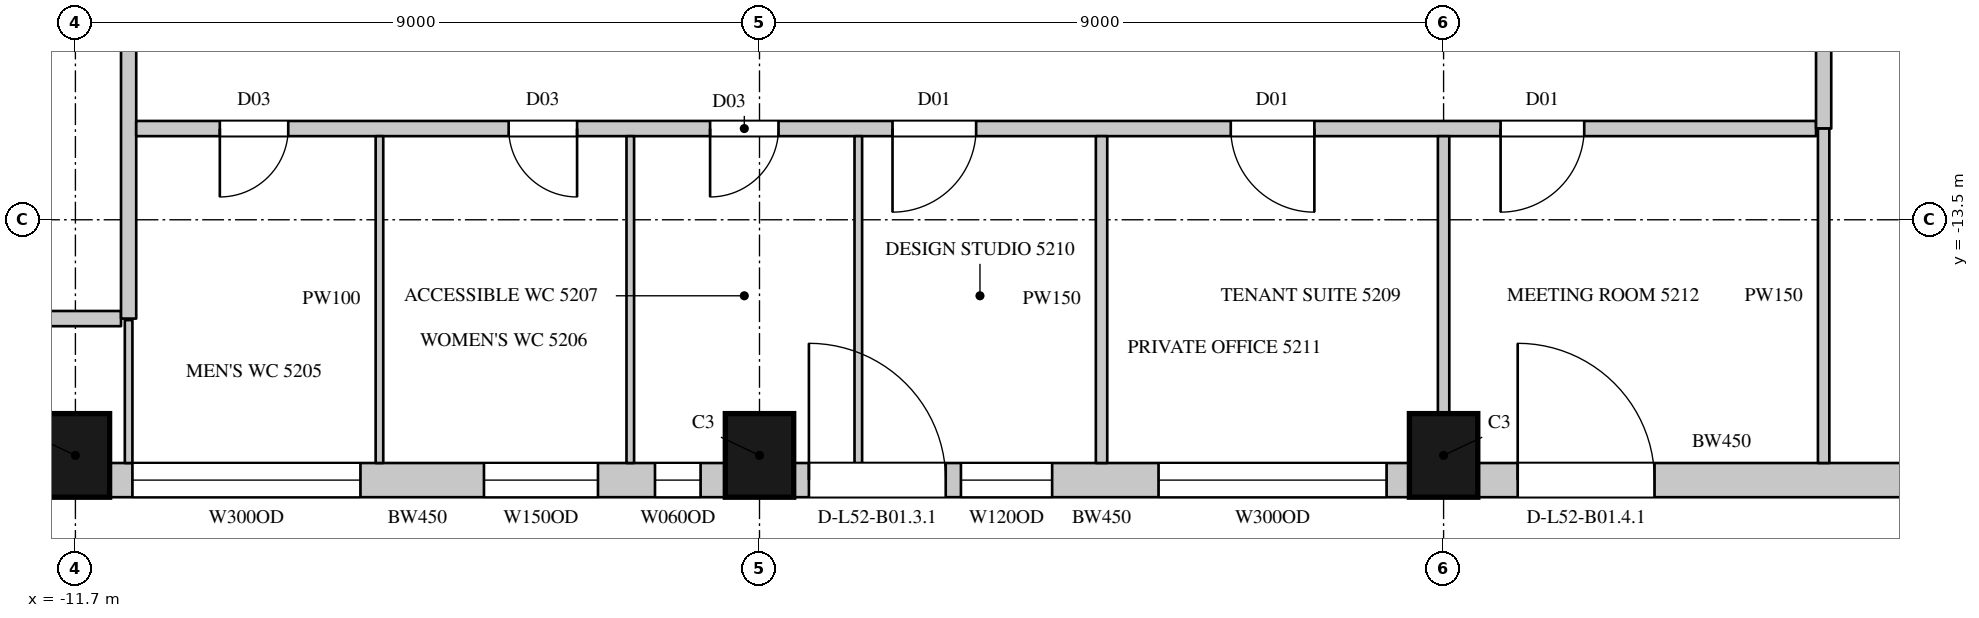
"""IFC4 building model, lengths in metres.
Left out: names, types, materials, properties, quantities, classifications, styles, units other than length and angle.
Written with IfcOpenShell. Run it as: python <this file> out.ifc"""

import sys

from ifc_helpers import new_model, si_unit, direction, frame, frame_2d, origin, origin_2d, place, context, subcontext, project, spatial, rectangle, extrude, element, fill, save


model = new_model("IFC4")
c1 = context("Model", 3, precision=1e-05, world=origin(), true_north=direction((0.0, 1.0)))
c2 = subcontext(c1, "Body", "Model", "MODEL_VIEW")
j1 = project(units=[si_unit("LENGTHUNIT", "METRE"), si_unit("PLANEANGLEUNIT", "RADIAN")], contexts=[c1])
p1 = place(None, origin())
s1 = spatial("IfcSite", under=j1, at=p1, CompositionType="ELEMENT")
p2 = place(p1, origin())
s2 = spatial("IfcBuilding", under=s1, at=p2, CompositionType="ELEMENT")
p3 = place(p2, frame((0.0, 0.0, 234.3)))
s3 = spatial("IfcBuildingStorey", under=s2, at=p3, CompositionType="ELEMENT", Elevation=234.3)
for number, where, z_axis, x_axis in (
    (1, (-11.7, -16.6, 0.0), (0.0, 0.0, 1.0), (1.0, 0.0, 0.0)),
    (2, (-2.7, -16.6, 0.0), (0.0, 0.0, 1.0), (1.0, 0.0, 0.0)),
    (3, (6.3, -16.6, 0.0), (0.0, 0.0, 1.0), (1.0, 0.0, 0.0)),
):
    element("IfcColumn", number, at=place(p3, frame(where, z_axis=z_axis, x_axis=x_axis)), inside=s3, PredefinedType="COLUMN", context=c2, shape_type="SweptSolid", body=[
        extrude(rectangle(XDim=0.9, YDim=1.1, at=origin_2d()), origin(), (0.0, 0.0, 1.0), 4.1),
    ])
p4 = place(p3, frame((-11.25, -16.925, 0.0), z_axis=(0.0, 0.0, 1.0), x_axis=(1.0, 0.0, 0.0)))
e4 = element("IfcWall", 4, at=p4, inside=s3, PredefinedType="SOLIDWALL", context=c2, shape_type="SweptSolid", body=[
    extrude(rectangle(XDim=8.1, YDim=0.45, at=frame_2d((4.05, 0.0))), origin(), (0.0, 0.0, 1.0), 3.8),
])
p5 = place(p4, frame((0.3, 0.0, 1.05)))
e5 = element("IfcOpeningElement", 5, at=p5, cuts=e4, PredefinedType="OPENING", context=c2, shape_type="SweptSolid", body=[
    extrude(rectangle(XDim=3.0, YDim=2.4, at=frame_2d((1.5, 1.2))), frame((0.0, 0.235, 0.0), z_axis=(0.0, -1.0, 0.0), x_axis=(1.0, 0.0, 0.0)), (0.0, 0.0, 1.0), 0.47),
])
p6 = place(p4, frame((4.925, 0.0, 1.05)))
e6 = element("IfcOpeningElement", 6, at=p6, cuts=e4, PredefinedType="OPENING", context=c2, shape_type="SweptSolid", body=[
    extrude(rectangle(XDim=1.5, YDim=2.4, at=frame_2d((0.75, 1.2))), frame((0.0, 0.235, 0.0), z_axis=(0.0, -1.0, 0.0), x_axis=(1.0, 0.0, 0.0)), (0.0, 0.0, 1.0), 0.47),
])
p7 = place(p4, frame((7.175, 0.0, 1.05)))
e7 = element("IfcOpeningElement", 7, at=p7, cuts=e4, PredefinedType="OPENING", context=c2, shape_type="SweptSolid", body=[
    extrude(rectangle(XDim=0.6, YDim=2.4, at=frame_2d((0.3, 1.2))), frame((0.0, 0.235, 0.0), z_axis=(0.0, -1.0, 0.0), x_axis=(1.0, 0.0, 0.0)), (0.0, 0.0, 1.0), 0.47),
])
p8 = place(p3, frame((-2.25, -16.925, 0.0), z_axis=(0.0, 0.0, 1.0), x_axis=(1.0, 0.0, 0.0)))
e8 = element("IfcWall", 8, at=p8, inside=s3, PredefinedType="SOLIDWALL", context=c2, shape_type="SweptSolid", body=[
    extrude(rectangle(XDim=8.1, YDim=0.45, at=frame_2d((4.05, 0.0))), origin(), (0.0, 0.0, 1.0), 3.8),
])
p9 = place(p8, frame((0.2, 0.0, 0.0)))
e9 = element("IfcOpeningElement", 9, at=p9, cuts=e8, PredefinedType="OPENING", context=c2, shape_type="SweptSolid", body=[
    extrude(rectangle(XDim=1.8, YDim=2.4, at=frame_2d((0.9, 1.2))), frame((0.0, 0.235, 0.0), z_axis=(0.0, -1.0, 0.0), x_axis=(1.0, 0.0, 0.0)), (0.0, 0.0, 1.0), 0.47),
])
p10 = place(p8, frame((2.2, 0.0, 1.05)))
e10 = element("IfcOpeningElement", 10, at=p10, cuts=e8, PredefinedType="OPENING", context=c2, shape_type="SweptSolid", body=[
    extrude(rectangle(XDim=1.2, YDim=2.4, at=frame_2d((0.6, 1.2))), frame((0.0, 0.235, 0.0), z_axis=(0.0, -1.0, 0.0), x_axis=(1.0, 0.0, 0.0)), (0.0, 0.0, 1.0), 0.47),
])
p11 = place(p8, frame((4.8, 0.0, 1.05)))
e11 = element("IfcOpeningElement", 11, at=p11, cuts=e8, PredefinedType="OPENING", context=c2, shape_type="SweptSolid", body=[
    extrude(rectangle(XDim=3.0, YDim=2.4, at=frame_2d((1.5, 1.2))), frame((0.0, 0.235, 0.0), z_axis=(0.0, -1.0, 0.0), x_axis=(1.0, 0.0, 0.0)), (0.0, 0.0, 1.0), 0.47),
])
p12 = place(p3, frame((6.75, -16.925, 0.0), z_axis=(0.0, 0.0, 1.0), x_axis=(1.0, 0.0, 0.0)))
e12 = element("IfcWall", 12, at=p12, inside=s3, PredefinedType="SOLIDWALL", context=c2, shape_type="SweptSolid", body=[
    extrude(rectangle(XDim=6.414, YDim=0.45, at=frame_2d((3.207, 0.0))), origin(), (0.0, 0.0, 1.0), 3.8),
])
p13 = place(p12, frame((0.525, 0.0, 0.0)))
e13 = element("IfcOpeningElement", 13, at=p13, cuts=e12, PredefinedType="OPENING", context=c2, shape_type="SweptSolid", body=[
    extrude(rectangle(XDim=1.8, YDim=2.4, at=frame_2d((0.9, 1.2))), frame((0.0, 0.235, 0.0), z_axis=(0.0, -1.0, 0.0), x_axis=(1.0, 0.0, 0.0)), (0.0, 0.0, 1.0), 0.47),
])
p14 = place(p3, frame((-13.97, -14.8, 0.0), z_axis=(0.0, 0.0, 1.0), x_axis=(1.0, 0.0, 0.0)))
e14 = element("IfcWall", 14, at=p14, inside=s3, PredefinedType="PARTITIONING", context=c2, shape_type="SweptSolid", body=[
    extrude(rectangle(XDim=2.87, YDim=0.2, at=frame_2d((1.435, 0.0))), origin(), (0.0, 0.0, 1.0), 3.8),
])
p15 = place(p3, frame((-11.0, -14.8, 0.0), z_axis=(0.0, 0.0, 1.0), x_axis=(0.0, 1.0, 0.0)))
e15 = element("IfcWall", 15, at=p15, inside=s3, PredefinedType="PARTITIONING", context=c2, shape_type="SweptSolid", body=[
    extrude(rectangle(XDim=29.6, YDim=0.2, at=frame_2d((14.8, 0.0))), origin(), (0.0, 0.0, 1.0), 3.8),
])
p16 = place(p15, frame((10.15, 0.0, 0.0)))
e16 = element("IfcOpeningElement", 16, at=p16, cuts=e15, PredefinedType="OPENING", context=c2, shape_type="SweptSolid", body=[
    extrude(rectangle(XDim=1.5, YDim=2.4, at=frame_2d((0.75, 1.2))), frame((0.0, 0.11, 0.0), z_axis=(0.0, -1.0, 0.0), x_axis=(1.0, 0.0, 0.0)), (0.0, 0.0, 1.0), 0.22),
])
p17 = place(p3, frame((-10.9, -12.3, 0.0), z_axis=(0.0, 0.0, 1.0), x_axis=(1.0, 0.0, 0.0)))
e17 = element("IfcWall", 17, at=p17, inside=s3, PredefinedType="PARTITIONING", context=c2, shape_type="SweptSolid", body=[
    extrude(rectangle(XDim=22.1, YDim=0.2, at=frame_2d((11.05, 0.0))), origin(), (0.0, 0.0, 1.0), 3.8),
])
p18 = place(p17, frame((1.1, 0.0, 0.0)))
e18 = element("IfcOpeningElement", 18, at=p18, cuts=e17, PredefinedType="OPENING", context=c2, shape_type="SweptSolid", body=[
    extrude(rectangle(XDim=0.9, YDim=2.2, at=frame_2d((0.45, 1.1))), frame((0.0, 0.11, 0.0), z_axis=(0.0, -1.0, 0.0), x_axis=(1.0, 0.0, 0.0)), (0.0, 0.0, 1.0), 0.22),
])
p19 = place(p17, frame((4.9, 0.0, 0.0)))
e19 = element("IfcOpeningElement", 19, at=p19, cuts=e17, PredefinedType="OPENING", context=c2, shape_type="SweptSolid", body=[
    extrude(rectangle(XDim=0.9, YDim=2.2, at=frame_2d((0.45, 1.1))), frame((0.0, 0.11, 0.0), z_axis=(0.0, -1.0, 0.0), x_axis=(1.0, 0.0, 0.0)), (0.0, 0.0, 1.0), 0.22),
])
p20 = place(p17, frame((7.55, 0.0, 0.0)))
e20 = element("IfcOpeningElement", 20, at=p20, cuts=e17, PredefinedType="OPENING", context=c2, shape_type="SweptSolid", body=[
    extrude(rectangle(XDim=0.9, YDim=2.2, at=frame_2d((0.45, 1.1))), frame((0.0, 0.11, 0.0), z_axis=(0.0, -1.0, 0.0), x_axis=(1.0, 0.0, 0.0)), (0.0, 0.0, 1.0), 0.22),
])
p21 = place(p17, frame((9.95, 0.0, 0.0)))
e21 = element("IfcOpeningElement", 21, at=p21, cuts=e17, PredefinedType="OPENING", context=c2, shape_type="SweptSolid", body=[
    extrude(rectangle(XDim=1.1, YDim=2.4, at=frame_2d((0.55, 1.2))), frame((0.0, 0.11, 0.0), z_axis=(0.0, -1.0, 0.0), x_axis=(1.0, 0.0, 0.0)), (0.0, 0.0, 1.0), 0.22),
])
p22 = place(p17, frame((14.4, 0.0, 0.0)))
e22 = element("IfcOpeningElement", 22, at=p22, cuts=e17, PredefinedType="OPENING", context=c2, shape_type="SweptSolid", body=[
    extrude(rectangle(XDim=1.1, YDim=2.4, at=frame_2d((0.55, 1.2))), frame((0.0, 0.11, 0.0), z_axis=(0.0, -1.0, 0.0), x_axis=(1.0, 0.0, 0.0)), (0.0, 0.0, 1.0), 0.22),
])
p23 = place(p17, frame((17.95, 0.0, 0.0)))
e23 = element("IfcOpeningElement", 23, at=p23, cuts=e17, PredefinedType="OPENING", context=c2, shape_type="SweptSolid", body=[
    extrude(rectangle(XDim=1.1, YDim=2.4, at=frame_2d((0.55, 1.2))), frame((0.0, 0.11, 0.0), z_axis=(0.0, -1.0, 0.0), x_axis=(1.0, 0.0, 0.0)), (0.0, 0.0, 1.0), 0.22),
])
p24 = place(p3, frame((11.3, -12.3, 0.0), z_axis=(0.0, 0.0, 1.0), x_axis=(0.0, 1.0, 0.0)))
e24 = element("IfcWall", 24, at=p24, inside=s3, PredefinedType="PARTITIONING", context=c2, shape_type="SweptSolid", body=[
    extrude(rectangle(XDim=24.5, YDim=0.2, at=frame_2d((12.25, 0.0))), origin(), (0.0, 0.0, 1.0), 3.8),
])
p25 = place(p24, frame((10.15, 0.0, 0.0)))
e25 = element("IfcOpeningElement", 25, at=p25, cuts=e24, PredefinedType="OPENING", context=c2, shape_type="SweptSolid", body=[
    extrude(rectangle(XDim=1.5, YDim=2.4, at=frame_2d((0.75, 1.2))), frame((0.0, 0.11, 0.0), z_axis=(0.0, -1.0, 0.0), x_axis=(1.0, 0.0, 0.0)), (0.0, 0.0, 1.0), 0.22),
])
p26 = place(p24, frame((3.3, 0.0, 0.0)))
e26 = element("IfcOpeningElement", 26, at=p26, cuts=e24, PredefinedType="OPENING", context=c2, shape_type="SweptSolid", body=[
    extrude(rectangle(XDim=1.1, YDim=2.4, at=frame_2d((0.55, 1.2))), frame((0.0, 0.11, 0.0), z_axis=(0.0, -1.0, 0.0), x_axis=(1.0, 0.0, 0.0)), (0.0, 0.0, 1.0), 0.22),
])
p27 = place(p3, frame((1.8, -16.7, 0.0), z_axis=(0.0, 0.0, 1.0), x_axis=(0.0, 1.0, 0.0)))
e27 = element("IfcWall", 27, at=p27, inside=s3, PredefinedType="PARTITIONING", context=c2, shape_type="SweptSolid", body=[
    extrude(rectangle(XDim=4.3, YDim=0.15, at=frame_2d((2.15, 0.0))), origin(), (0.0, 0.0, 1.0), 3.8),
])
p28 = place(p3, frame((6.3, -16.05, 0.0), z_axis=(0.0, 0.0, 1.0), x_axis=(0.0, 1.0, 0.0)))
e28 = element("IfcWall", 28, at=p28, inside=s3, PredefinedType="PARTITIONING", context=c2, shape_type="SweptSolid", body=[
    extrude(rectangle(XDim=3.65, YDim=0.15, at=frame_2d((1.825, 0.0))), origin(), (0.0, 0.0, 1.0), 3.25),
])
p29 = place(p3, frame((11.3, -16.7, 0.0), z_axis=(0.0, 0.0, 1.0), x_axis=(0.0, 1.0, 0.0)))
e29 = element("IfcWall", 29, at=p29, inside=s3, PredefinedType="PARTITIONING", context=c2, shape_type="SweptSolid", body=[
    extrude(rectangle(XDim=4.4, YDim=0.15, at=frame_2d((2.2, 0.0))), origin(), (0.0, 0.0, 1.0), 3.8),
])
p30 = place(p3, frame((-11.0, -16.7, 0.0), z_axis=(0.0, 0.0, 1.0), x_axis=(0.0, 1.0, 0.0)))
e30 = element("IfcWall", 30, at=p30, inside=s3, PredefinedType="PARTITIONING", context=c2, shape_type="SweptSolid", body=[
    extrude(rectangle(XDim=1.88, YDim=0.1, at=frame_2d((0.94, 0.0))), origin(), (0.0, 0.0, 1.0), 3.8),
])
for number, where, z_axis, x_axis in (
    (31, (-7.7, -16.7, 0.0), (0.0, 0.0, 1.0), (0.0, 1.0, 0.0)),
    (32, (-4.4, -16.7, 0.0), (0.0, 0.0, 1.0), (0.0, 1.0, 0.0)),
    (33, (-1.4, -16.7, 0.0), (0.0, 0.0, 1.0), (0.0, 1.0, 0.0)),
):
    element("IfcWall", number, at=place(p3, frame(where, z_axis=z_axis, x_axis=x_axis)), inside=s3, PredefinedType="PARTITIONING", context=c2, shape_type="SweptSolid", body=[
        extrude(rectangle(XDim=4.3, YDim=0.1, at=frame_2d((2.15, 0.0))), origin(), (0.0, 0.0, 1.0), 3.8),
    ])
p31 = place(p5, origin())
e34 = element("IfcWindow", 34, at=p31, inside=s3, PartitioningType="SINGLE_PANEL", PredefinedType="WINDOW", context=c2, shape_type="SweptSolid", body=[
    extrude(rectangle(XDim=3.0, YDim=2.4, at=frame_2d((1.5, 1.2))), frame((0.0, 0.135, 0.0), z_axis=(0.0, -1.0, 0.0), x_axis=(1.0, 0.0, 0.0)), (0.0, 0.0, 1.0), 0.06),
])
fill(e5, e34)
p32 = place(p9, origin())
e35 = element("IfcDoor", 35, at=p32, inside=s3, OperationType="SLIDING_TO_LEFT", PredefinedType="DOOR", context=c2, shape_type="SweptSolid", body=[
    extrude(rectangle(XDim=1.8, YDim=2.4, at=frame_2d((0.9, 1.2))), frame((0.0, 0.13, 0.0), z_axis=(0.0, -1.0, 0.0), x_axis=(1.0, 0.0, 0.0)), (0.0, 0.0, 1.0), 0.05),
])
fill(e9, e35)
p33 = place(p10, origin())
e36 = element("IfcWindow", 36, at=p33, inside=s3, PartitioningType="SINGLE_PANEL", PredefinedType="WINDOW", context=c2, shape_type="SweptSolid", body=[
    extrude(rectangle(XDim=1.2, YDim=2.4, at=frame_2d((0.6, 1.2))), frame((0.0, 0.135, 0.0), z_axis=(0.0, -1.0, 0.0), x_axis=(1.0, 0.0, 0.0)), (0.0, 0.0, 1.0), 0.06),
])
fill(e10, e36)
p34 = place(p11, origin())
e37 = element("IfcWindow", 37, at=p34, inside=s3, PartitioningType="SINGLE_PANEL", PredefinedType="WINDOW", context=c2, shape_type="SweptSolid", body=[
    extrude(rectangle(XDim=3.0, YDim=2.4, at=frame_2d((1.5, 1.2))), frame((0.0, 0.135, 0.0), z_axis=(0.0, -1.0, 0.0), x_axis=(1.0, 0.0, 0.0)), (0.0, 0.0, 1.0), 0.06),
])
fill(e11, e37)
p35 = place(p13, origin())
e38 = element("IfcDoor", 38, at=p35, inside=s3, OperationType="SLIDING_TO_LEFT", PredefinedType="DOOR", context=c2, shape_type="SweptSolid", body=[
    extrude(rectangle(XDim=1.8, YDim=2.4, at=frame_2d((0.9, 1.2))), frame((0.0, 0.13, 0.0), z_axis=(0.0, -1.0, 0.0), x_axis=(1.0, 0.0, 0.0)), (0.0, 0.0, 1.0), 0.05),
])
fill(e13, e38)
p36 = place(p18, origin())
e39 = element("IfcDoor", 39, at=p36, inside=s3, OperationType="SINGLE_SWING_RIGHT", PredefinedType="DOOR", context=c2, shape_type="SweptSolid", body=[
    extrude(rectangle(XDim=0.9, YDim=2.2, at=frame_2d((0.45, 1.1))), frame((0.0, 0.025, 0.0), z_axis=(0.0, -1.0, 0.0), x_axis=(1.0, 0.0, 0.0)), (0.0, 0.0, 1.0), 0.05),
])
fill(e18, e39)
p37 = place(p19, origin())
e40 = element("IfcDoor", 40, at=p37, inside=s3, OperationType="SINGLE_SWING_LEFT", PredefinedType="DOOR", context=c2, shape_type="SweptSolid", body=[
    extrude(rectangle(XDim=0.9, YDim=2.2, at=frame_2d((0.45, 1.1))), frame((0.0, 0.025, 0.0), z_axis=(0.0, -1.0, 0.0), x_axis=(1.0, 0.0, 0.0)), (0.0, 0.0, 1.0), 0.05),
])
fill(e19, e40)
p38 = place(p20, origin())
e41 = element("IfcDoor", 41, at=p38, inside=s3, OperationType="SINGLE_SWING_RIGHT", PredefinedType="DOOR", context=c2, shape_type="SweptSolid", body=[
    extrude(rectangle(XDim=0.9, YDim=2.2, at=frame_2d((0.45, 1.1))), frame((0.0, 0.025, 0.0), z_axis=(0.0, -1.0, 0.0), x_axis=(1.0, 0.0, 0.0)), (0.0, 0.0, 1.0), 0.05),
])
fill(e20, e41)
p39 = place(p21, origin())
e42 = element("IfcDoor", 42, at=p39, inside=s3, OperationType="SINGLE_SWING_RIGHT", PredefinedType="DOOR", context=c2, shape_type="SweptSolid", body=[
    extrude(rectangle(XDim=1.1, YDim=2.4, at=frame_2d((0.55, 1.2))), frame((0.0, 0.025, 0.0), z_axis=(0.0, -1.0, 0.0), x_axis=(1.0, 0.0, 0.0)), (0.0, 0.0, 1.0), 0.05),
])
fill(e21, e42)
p40 = place(p22, origin())
e43 = element("IfcDoor", 43, at=p40, inside=s3, OperationType="SINGLE_SWING_LEFT", PredefinedType="DOOR", context=c2, shape_type="SweptSolid", body=[
    extrude(rectangle(XDim=1.1, YDim=2.4, at=frame_2d((0.55, 1.2))), frame((0.0, 0.025, 0.0), z_axis=(0.0, -1.0, 0.0), x_axis=(1.0, 0.0, 0.0)), (0.0, 0.0, 1.0), 0.05),
])
fill(e22, e43)
p41 = place(p23, origin())
e44 = element("IfcDoor", 44, at=p41, inside=s3, OperationType="SINGLE_SWING_RIGHT", PredefinedType="DOOR", context=c2, shape_type="SweptSolid", body=[
    extrude(rectangle(XDim=1.1, YDim=2.4, at=frame_2d((0.55, 1.2))), frame((0.0, 0.025, 0.0), z_axis=(0.0, -1.0, 0.0), x_axis=(1.0, 0.0, 0.0)), (0.0, 0.0, 1.0), 0.05),
])
fill(e23, e44)
p42 = place(p6, origin())
e45 = element("IfcWindow", 45, at=p42, inside=s3, PartitioningType="SINGLE_PANEL", PredefinedType="WINDOW", context=c2, shape_type="SweptSolid", body=[
    extrude(rectangle(XDim=1.5, YDim=2.4, at=frame_2d((0.75, 1.2))), frame((0.0, 0.135, 0.0), z_axis=(0.0, -1.0, 0.0), x_axis=(1.0, 0.0, 0.0)), (0.0, 0.0, 1.0), 0.06),
])
fill(e6, e45)
p43 = place(p7, origin())
e46 = element("IfcWindow", 46, at=p43, inside=s3, PartitioningType="SINGLE_PANEL", PredefinedType="WINDOW", context=c2, shape_type="SweptSolid", body=[
    extrude(rectangle(XDim=0.6, YDim=2.4, at=frame_2d((0.3, 1.2))), frame((0.0, 0.135, 0.0), z_axis=(0.0, -1.0, 0.0), x_axis=(1.0, 0.0, 0.0)), (0.0, 0.0, 1.0), 0.06),
])
fill(e7, e46)
save(model, sys.argv[1])
